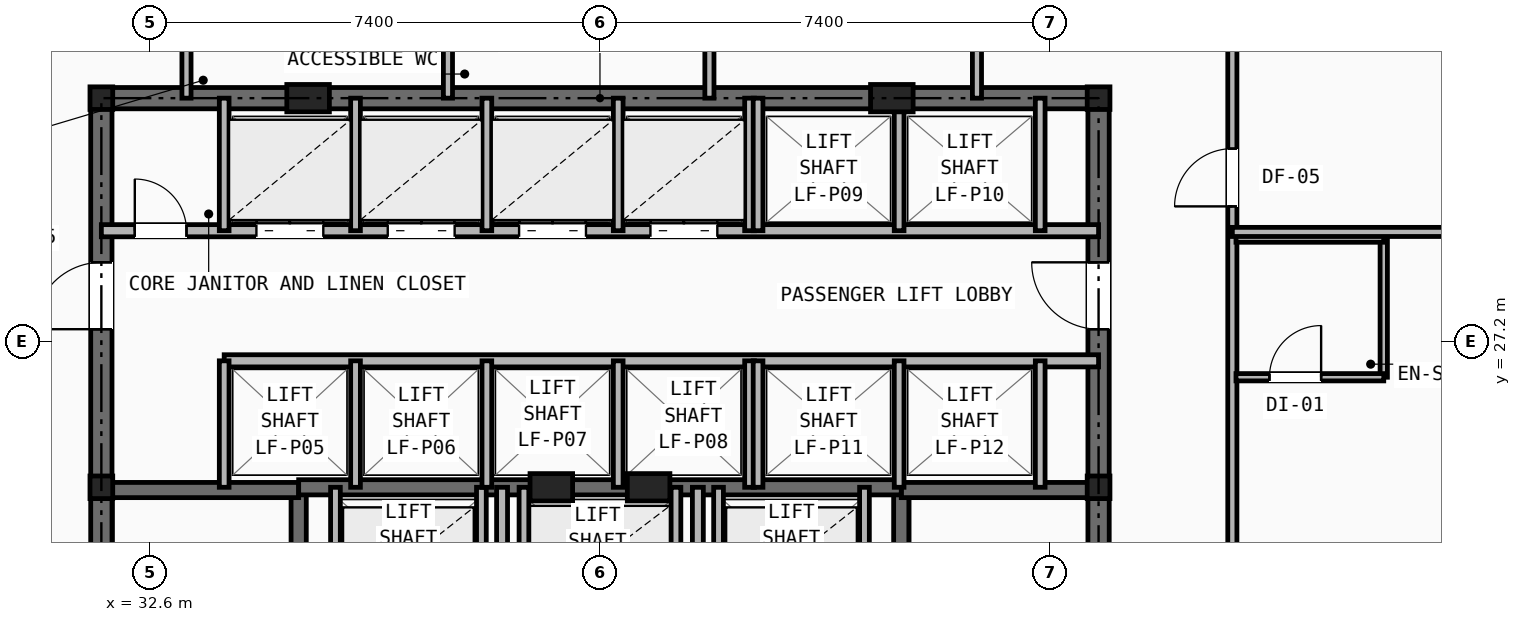
"""IFC4 building model, lengths in metres.
Left out: names, types, materials, properties, quantities, classifications, styles, units other than length and angle.
Written with IfcOpenShell. Run it as: python <this file> out.ifc"""

import sys

from ifc_helpers import new_model, si_unit, direction, frame, frame_2d, origin, origin_2d, place, context, subcontext, project, spatial, rectangle, i_section, extrude, element, fill, save


model = new_model("IFC4")
c1 = context("Model", 3, precision=1e-05, world=origin(), true_north=direction((0.0, 1.0)))
c2 = subcontext(c1, "Body", "Model", "MODEL_VIEW")
j1 = project(units=[si_unit("LENGTHUNIT", "METRE"), si_unit("PLANEANGLEUNIT", "RADIAN")], contexts=[c1])
p1 = place(None, origin())
s1 = spatial("IfcSite", under=j1, at=p1, CompositionType="ELEMENT")
p2 = place(p1, origin())
s2 = spatial("IfcBuilding", under=s1, at=p2, CompositionType="ELEMENT")
p3 = place(p2, frame((0.0, 0.0, 30.4)))
s3 = spatial("IfcBuildingStorey", under=s2, at=p3, CompositionType="ELEMENT", Elevation=30.4)
for number, where, z_axis, x_axis in (
    (1, (31.8, 24.8, 0.0), (0.0, 0.0, 1.0), (1.0, 0.0, 0.0)),
    (2, (48.2, 24.8, 0.0), (0.0, 0.0, 1.0), (1.0, 0.0, 0.0)),
    (3, (31.8, 31.2, 0.0), (0.0, 0.0, 1.0), (1.0, 0.0, 0.0)),
    (4, (48.2, 31.2, 0.0), (0.0, 0.0, 1.0), (1.0, 0.0, 0.0)),
):
    element("IfcColumn", number, at=place(p3, frame(where, z_axis=z_axis, x_axis=x_axis)), inside=s3, PredefinedType="COLUMN", context=c2, shape_type="SweptSolid", body=[
        extrude(i_section(OverallWidth=0.374, OverallDepth=0.372, WebThickness=0.016, FlangeThickness=0.026, at=origin_2d()), origin(), (0.0, 0.0, 1.0), 3.2),
    ])
for number, where, z_axis, x_axis in (
    (5, (35.2, 31.2, 0.0), (0.0, 0.0, 1.0), (1.0, 0.0, 0.0)),
    (6, (44.8, 31.2, 0.0), (0.0, 0.0, 1.0), (1.0, 0.0, 0.0)),
    (7, (39.2, 24.8, 0.0), (0.0, 0.0, 1.0), (1.0, 0.0, 0.0)),
    (8, (40.8, 24.8, 0.0), (0.0, 0.0, 1.0), (1.0, 0.0, 0.0)),
):
    element("IfcColumn", number, at=place(p3, frame(where, z_axis=z_axis, x_axis=x_axis)), inside=s3, PredefinedType="PILASTER", context=c2, shape_type="SweptSolid", body=[
        extrude(rectangle(XDim=0.7, YDim=0.45, at=origin_2d()), origin(), (0.0, 0.0, 1.0), 3.2),
    ])
p4 = place(p3, frame((31.8, 31.2, 0.0), z_axis=(0.0, 0.0, 1.0), x_axis=(1.0, 0.0, 0.0)))
e9 = element("IfcWall", 9, at=p4, inside=s3, PredefinedType="SHEAR", context=c2, shape_type="SweptSolid", body=[
    extrude(rectangle(XDim=16.4, YDim=0.35, at=frame_2d((8.2, 0.0))), origin(), (0.0, 0.0, 1.0), 2.98),
])
p5 = place(p3, frame((31.8, 16.4, 0.0), z_axis=(0.0, 0.0, 1.0), x_axis=(0.0, 1.0, 0.0)))
e10 = element("IfcWall", 10, at=p5, inside=s3, PredefinedType="SHEAR", context=c2, shape_type="SweptSolid", body=[
    extrude(rectangle(XDim=14.8, YDim=0.35, at=frame_2d((7.4, 0.0))), origin(), (0.0, 0.0, 1.0), 2.98),
])
p6 = place(p5, frame((11.0, 0.0, 0.0)))
e11 = element("IfcOpeningElement", 11, at=p6, cuts=e10, PredefinedType="OPENING", context=c2, shape_type="SweptSolid", body=[
    extrude(rectangle(XDim=1.1, YDim=2.15, at=frame_2d((0.55, 1.075))), frame((0.0, 0.185, 0.0), z_axis=(0.0, -1.0, 0.0), x_axis=(1.0, 0.0, 0.0)), (0.0, 0.0, 1.0), 0.37),
])
p7 = place(p3, frame((48.2, 16.4, 0.0), z_axis=(0.0, 0.0, 1.0), x_axis=(0.0, 1.0, 0.0)))
e12 = element("IfcWall", 12, at=p7, inside=s3, PredefinedType="SHEAR", context=c2, shape_type="SweptSolid", body=[
    extrude(rectangle(XDim=14.8, YDim=0.35, at=frame_2d((7.4, 0.0))), origin(), (0.0, 0.0, 1.0), 2.98),
])
p8 = place(p7, frame((11.0, 0.0, 0.0)))
e13 = element("IfcOpeningElement", 13, at=p8, cuts=e12, PredefinedType="OPENING", context=c2, shape_type="SweptSolid", body=[
    extrude(rectangle(XDim=1.1, YDim=2.15, at=frame_2d((0.55, 1.075))), frame((0.0, 0.185, 0.0), z_axis=(0.0, -1.0, 0.0), x_axis=(1.0, 0.0, 0.0)), (0.0, 0.0, 1.0), 0.37),
])
p9 = place(p3, frame((35.045, 16.4, 0.0), z_axis=(0.0, 0.0, 1.0), x_axis=(0.0, 1.0, 0.0)))
e14 = element("IfcWall", 14, at=p9, inside=s3, PredefinedType="SHEAR", context=c2, shape_type="SweptSolid", body=[
    extrude(rectangle(XDim=8.4, YDim=0.25, at=frame_2d((4.2, 0.0))), origin(), (0.0, 0.0, 1.0), 2.98),
])
p10 = place(p9, frame((0.45, 0.0, 0.0)))
e15 = element("IfcOpeningElement", 15, at=p10, cuts=e14, PredefinedType="OPENING", context=c2, shape_type="SweptSolid", body=[
    extrude(rectangle(XDim=0.95, YDim=2.1, at=frame_2d((0.475, 1.05))), frame((0.0, 0.135, 0.0), z_axis=(0.0, -1.0, 0.0), x_axis=(1.0, 0.0, 0.0)), (0.0, 0.0, 1.0), 0.27),
])
p11 = place(p3, frame((31.8, 24.755, 0.0), z_axis=(0.0, 0.0, 1.0), x_axis=(1.0, 0.0, 0.0)))
e16 = element("IfcWall", 16, at=p11, inside=s3, PredefinedType="SHEAR", context=c2, shape_type="SweptSolid", body=[
    extrude(rectangle(XDim=3.245, YDim=0.25, at=frame_2d((1.623, 0.0))), origin(), (0.0, 0.0, 1.0), 2.98),
])
p12 = place(p3, frame((44.955, 16.4, 0.0), z_axis=(0.0, 0.0, 1.0), x_axis=(0.0, 1.0, 0.0)))
e17 = element("IfcWall", 17, at=p12, inside=s3, PredefinedType="SHEAR", context=c2, shape_type="SweptSolid", body=[
    extrude(rectangle(XDim=8.4, YDim=0.25, at=frame_2d((4.2, 0.0))), origin(), (0.0, 0.0, 1.0), 2.98),
])
p13 = place(p12, frame((0.45, 0.0, 0.0)))
e18 = element("IfcOpeningElement", 18, at=p13, cuts=e17, PredefinedType="OPENING", context=c2, shape_type="SweptSolid", body=[
    extrude(rectangle(XDim=0.95, YDim=2.1, at=frame_2d((0.475, 1.05))), frame((0.0, 0.135, 0.0), z_axis=(0.0, -1.0, 0.0), x_axis=(1.0, 0.0, 0.0)), (0.0, 0.0, 1.0), 0.27),
])
p14 = place(p3, frame((44.955, 24.755, 0.0), z_axis=(0.0, 0.0, 1.0), x_axis=(1.0, 0.0, 0.0)))
e19 = element("IfcWall", 19, at=p14, inside=s3, PredefinedType="SHEAR", context=c2, shape_type="SweptSolid", body=[
    extrude(rectangle(XDim=3.245, YDim=0.25, at=frame_2d((1.623, 0.0))), origin(), (0.0, 0.0, 1.0), 2.98),
])
p15 = place(p3, frame((35.045, 24.8, 0.0), z_axis=(0.0, 0.0, 1.0), x_axis=(1.0, 0.0, 0.0)))
e20 = element("IfcWall", 20, at=p15, inside=s3, PredefinedType="SHEAR", context=c2, shape_type="SweptSolid", body=[
    extrude(rectangle(XDim=9.91, YDim=0.25, at=frame_2d((4.955, 0.0))), origin(), (0.0, 0.0, 1.0), 2.98),
])
p16 = place(p3, frame((38.39, 16.4, 0.0), z_axis=(0.0, 0.0, 1.0), x_axis=(0.0, 1.0, 0.0)))
e21 = element("IfcWall", 21, at=p16, inside=s3, PredefinedType="PARTITIONING", context=c2, shape_type="SweptSolid", body=[
    extrude(rectangle(XDim=8.4, YDim=0.18, at=frame_2d((4.2, 0.0))), origin(), (0.0, 0.0, 1.0), 2.431),
])
p17 = place(p16, frame((3.8, 0.0, 0.0)))
e22 = element("IfcOpeningElement", 22, at=p17, cuts=e21, PredefinedType="OPENING", context=c2, shape_type="SweptSolid", body=[
    extrude(rectangle(XDim=0.95, YDim=2.1, at=frame_2d((0.475, 1.05))), frame((0.0, 0.1, 0.0), z_axis=(0.0, -1.0, 0.0), x_axis=(1.0, 0.0, 0.0)), (0.0, 0.0, 1.0), 0.2),
])
p18 = place(p3, frame((41.61, 16.4, 0.0), z_axis=(0.0, 0.0, 1.0), x_axis=(0.0, 1.0, 0.0)))
e23 = element("IfcWall", 23, at=p18, inside=s3, PredefinedType="PARTITIONING", context=c2, shape_type="SweptSolid", body=[
    extrude(rectangle(XDim=8.4, YDim=0.18, at=frame_2d((4.2, 0.0))), origin(), (0.0, 0.0, 1.0), 2.431),
])
for number, where, z_axis, x_axis in (
    (24, (35.65, 22.48, 0.0), (0.0, 0.0, 1.0), (0.0, 1.0, 0.0)),
    (25, (38.05, 22.48, 0.0), (0.0, 0.0, 1.0), (0.0, 1.0, 0.0)),
    (26, (41.95, 22.48, 0.0), (0.0, 0.0, 1.0), (0.0, 1.0, 0.0)),
    (27, (44.35, 22.48, 0.0), (0.0, 0.0, 1.0), (0.0, 1.0, 0.0)),
    (28, (38.75, 22.48, 0.0), (0.0, 0.0, 1.0), (0.0, 1.0, 0.0)),
    (29, (41.25, 22.48, 0.0), (0.0, 0.0, 1.0), (0.0, 1.0, 0.0)),
):
    element("IfcWall", number, at=place(p3, frame(where, z_axis=z_axis, x_axis=x_axis)), inside=s3, PredefinedType="SOLIDWALL", context=c2, shape_type="SweptSolid", body=[
        extrude(rectangle(XDim=2.32, YDim=0.16, at=frame_2d((1.16, 0.0))), origin(), (0.0, 0.0, 1.0), 2.98),
    ])
p19 = place(p3, frame((31.8, 29.02, 0.0), z_axis=(0.0, 0.0, 1.0), x_axis=(1.0, 0.0, 0.0)))
e30 = element("IfcWall", 30, at=p19, inside=s3, PredefinedType="SOLIDWALL", context=c2, shape_type="SweptSolid", body=[
    extrude(rectangle(XDim=16.4, YDim=0.2, at=frame_2d((8.2, 0.0))), origin(), (0.0, 0.0, 1.0), 2.431),
])
p20 = place(p19, frame((0.55, 0.0, 0.0)))
e31 = element("IfcOpeningElement", 31, at=p20, cuts=e30, PredefinedType="OPENING", context=c2, shape_type="SweptSolid", body=[
    extrude(rectangle(XDim=0.85, YDim=2.05, at=frame_2d((0.425, 1.025))), frame((0.0, 0.11, 0.0), z_axis=(0.0, -1.0, 0.0), x_axis=(1.0, 0.0, 0.0)), (0.0, 0.0, 1.0), 0.22),
])
p21 = place(p19, frame((2.55, 0.0, 0.0)))
e32 = element("IfcOpeningElement", 32, at=p21, cuts=e30, PredefinedType="OPENING", context=c2, shape_type="SweptSolid", body=[
    extrude(rectangle(XDim=1.1, YDim=2.15, at=frame_2d((0.55, 1.075))), frame((0.0, 0.11, 0.0), z_axis=(0.0, -1.0, 0.0), x_axis=(1.0, 0.0, 0.0)), (0.0, 0.0, 1.0), 0.22),
])
p22 = place(p19, frame((4.71, 0.0, 0.0)))
e33 = element("IfcOpeningElement", 33, at=p22, cuts=e30, PredefinedType="OPENING", context=c2, shape_type="SweptSolid", body=[
    extrude(rectangle(XDim=1.1, YDim=2.15, at=frame_2d((0.55, 1.075))), frame((0.0, 0.11, 0.0), z_axis=(0.0, -1.0, 0.0), x_axis=(1.0, 0.0, 0.0)), (0.0, 0.0, 1.0), 0.22),
])
p23 = place(p19, frame((6.87, 0.0, 0.0)))
e34 = element("IfcOpeningElement", 34, at=p23, cuts=e30, PredefinedType="OPENING", context=c2, shape_type="SweptSolid", body=[
    extrude(rectangle(XDim=1.1, YDim=2.15, at=frame_2d((0.55, 1.075))), frame((0.0, 0.11, 0.0), z_axis=(0.0, -1.0, 0.0), x_axis=(1.0, 0.0, 0.0)), (0.0, 0.0, 1.0), 0.22),
])
p24 = place(p19, frame((9.03, 0.0, 0.0)))
e35 = element("IfcOpeningElement", 35, at=p24, cuts=e30, PredefinedType="OPENING", context=c2, shape_type="SweptSolid", body=[
    extrude(rectangle(XDim=1.1, YDim=2.15, at=frame_2d((0.55, 1.075))), frame((0.0, 0.11, 0.0), z_axis=(0.0, -1.0, 0.0), x_axis=(1.0, 0.0, 0.0)), (0.0, 0.0, 1.0), 0.22),
])
p25 = place(p3, frame((33.82, 26.88, 0.0), z_axis=(0.0, 0.0, 1.0), x_axis=(1.0, 0.0, 0.0)))
e36 = element("IfcWall", 36, at=p25, inside=s3, PredefinedType="SOLIDWALL", context=c2, shape_type="SweptSolid", body=[
    extrude(rectangle(XDim=14.38, YDim=0.2, at=frame_2d((7.19, 0.0))), origin(), (0.0, 0.0, 1.0), 2.431),
])
p26 = place(p3, frame((33.82, 29.02, 0.0), z_axis=(0.0, 0.0, 1.0), x_axis=(0.0, 1.0, 0.0)))
e37 = element("IfcWall", 37, at=p26, inside=s3, PredefinedType="SOLIDWALL", context=c2, shape_type="SweptSolid", body=[
    extrude(rectangle(XDim=2.18, YDim=0.16, at=frame_2d((1.09, 0.0))), origin(), (0.0, 0.0, 1.0), 2.431),
])
p27 = place(p3, frame((33.82, 24.8, 0.0), z_axis=(0.0, 0.0, 1.0), x_axis=(0.0, 1.0, 0.0)))
e38 = element("IfcWall", 38, at=p27, inside=s3, PredefinedType="SOLIDWALL", context=c2, shape_type="SweptSolid", body=[
    extrude(rectangle(XDim=2.08, YDim=0.16, at=frame_2d((1.04, 0.0))), origin(), (0.0, 0.0, 1.0), 2.98),
])
for number, where, z_axis, x_axis in (
    (39, (35.98, 29.02, 0.0), (0.0, 0.0, 1.0), (0.0, 1.0, 0.0)),
    (40, (38.14, 29.02, 0.0), (0.0, 0.0, 1.0), (0.0, 1.0, 0.0)),
    (41, (40.3, 29.02, 0.0), (0.0, 0.0, 1.0), (0.0, 1.0, 0.0)),
    (42, (42.46, 29.02, 0.0), (0.0, 0.0, 1.0), (0.0, 1.0, 0.0)),
):
    element("IfcWall", number, at=place(p3, frame(where, z_axis=z_axis, x_axis=x_axis)), inside=s3, PredefinedType="SOLIDWALL", context=c2, shape_type="SweptSolid", body=[
        extrude(rectangle(XDim=2.18, YDim=0.16, at=frame_2d((1.09, 0.0))), origin(), (0.0, 0.0, 1.0), 2.431),
    ])
for number, where, z_axis, x_axis in (
    (43, (35.98, 24.8, 0.0), (0.0, 0.0, 1.0), (0.0, 1.0, 0.0)),
    (44, (38.14, 24.8, 0.0), (0.0, 0.0, 1.0), (0.0, 1.0, 0.0)),
    (45, (40.3, 24.8, 0.0), (0.0, 0.0, 1.0), (0.0, 1.0, 0.0)),
    (46, (42.46, 24.8, 0.0), (0.0, 0.0, 1.0), (0.0, 1.0, 0.0)),
):
    element("IfcWall", number, at=place(p3, frame(where, z_axis=z_axis, x_axis=x_axis)), inside=s3, PredefinedType="SOLIDWALL", context=c2, shape_type="SweptSolid", body=[
        extrude(rectangle(XDim=2.08, YDim=0.16, at=frame_2d((1.04, 0.0))), origin(), (0.0, 0.0, 1.0), 2.98),
    ])
for number, where, z_axis, x_axis in (
    (47, (42.6, 29.02, 0.0), (0.0, 0.0, 1.0), (0.0, 1.0, 0.0)),
    (48, (44.92, 29.02, 0.0), (0.0, 0.0, 1.0), (0.0, 1.0, 0.0)),
    (49, (47.24, 29.02, 0.0), (0.0, 0.0, 1.0), (0.0, 1.0, 0.0)),
):
    element("IfcWall", number, at=place(p3, frame(where, z_axis=z_axis, x_axis=x_axis)), inside=s3, PredefinedType="SOLIDWALL", context=c2, shape_type="SweptSolid", body=[
        extrude(rectangle(XDim=2.18, YDim=0.16, at=frame_2d((1.09, 0.0))), origin(), (0.0, 0.0, 1.0), 2.431),
    ])
for number, where, z_axis, x_axis in (
    (50, (42.6, 24.8, 0.0), (0.0, 0.0, 1.0), (0.0, 1.0, 0.0)),
    (51, (44.92, 24.8, 0.0), (0.0, 0.0, 1.0), (0.0, 1.0, 0.0)),
    (52, (47.24, 24.8, 0.0), (0.0, 0.0, 1.0), (0.0, 1.0, 0.0)),
):
    element("IfcWall", number, at=place(p3, frame(where, z_axis=z_axis, x_axis=x_axis)), inside=s3, PredefinedType="SOLIDWALL", context=c2, shape_type="SweptSolid", body=[
        extrude(rectangle(XDim=2.08, YDim=0.16, at=frame_2d((1.04, 0.0))), origin(), (0.0, 0.0, 1.0), 2.98),
    ])
for number, where, z_axis, x_axis in (
    (53, (33.2, 31.2, 0.0), (0.0, 0.0, 1.0), (0.0, 1.0, 0.0)),
    (54, (46.2, 31.2, 0.0), (0.0, 0.0, 1.0), (0.0, 1.0, 0.0)),
    (55, (37.5, 31.2, 0.0), (0.0, 0.0, 1.0), (0.0, 1.0, 0.0)),
    (56, (41.8, 31.2, 0.0), (0.0, 0.0, 1.0), (0.0, 1.0, 0.0)),
):
    element("IfcWall", number, at=place(p3, frame(where, z_axis=z_axis, x_axis=x_axis)), inside=s3, PredefinedType="PARTITIONING", context=c2, shape_type="SweptSolid", body=[
        extrude(rectangle(XDim=2.6, YDim=0.15, at=frame_2d((1.3, 0.0))), origin(), (0.0, 0.0, 1.0), 2.431),
    ])
p28 = place(p3, frame((50.4, 14.1, 0.0), z_axis=(0.0, 0.0, 1.0), x_axis=(0.0, 1.0, 0.0)))
e57 = element("IfcWall", 57, at=p28, inside=s3, PredefinedType="PARTITIONING", context=c2, shape_type="SweptSolid", body=[
    extrude(rectangle(XDim=21.9, YDim=0.15, at=frame_2d((10.95, 0.0))), origin(), (0.0, 0.0, 1.0), 2.431),
])
p29 = place(p28, frame((0.42, 0.0, 0.0)))
e58 = element("IfcOpeningElement", 58, at=p29, cuts=e57, PredefinedType="OPENING", context=c2, shape_type="SweptSolid", body=[
    extrude(rectangle(XDim=0.95, YDim=2.1, at=frame_2d((0.475, 1.05))), frame((0.0, 0.085, 0.0), z_axis=(0.0, -1.0, 0.0), x_axis=(1.0, 0.0, 0.0)), (0.0, 0.0, 1.0), 0.17),
])
p30 = place(p28, frame((7.82, 0.0, 0.0)))
e59 = element("IfcOpeningElement", 59, at=p30, cuts=e57, PredefinedType="OPENING", context=c2, shape_type="SweptSolid", body=[
    extrude(rectangle(XDim=0.95, YDim=2.1, at=frame_2d((0.475, 1.05))), frame((0.0, 0.085, 0.0), z_axis=(0.0, -1.0, 0.0), x_axis=(1.0, 0.0, 0.0)), (0.0, 0.0, 1.0), 0.17),
])
p31 = place(p28, frame((15.32, 0.0, 0.0)))
e60 = element("IfcOpeningElement", 60, at=p31, cuts=e57, PredefinedType="OPENING", context=c2, shape_type="SweptSolid", body=[
    extrude(rectangle(XDim=0.95, YDim=2.1, at=frame_2d((0.475, 1.05))), frame((0.0, 0.085, 0.0), z_axis=(0.0, -1.0, 0.0), x_axis=(1.0, 0.0, 0.0)), (0.0, 0.0, 1.0), 0.17),
])
p32 = place(p3, frame((52.89, 26.61, 0.0), z_axis=(0.0, 0.0, 1.0), x_axis=(0.0, 1.0, 0.0)))
e61 = element("IfcWall", 61, at=p32, inside=s3, PredefinedType="PARTITIONING", context=c2, shape_type="SweptSolid", body=[
    extrude(rectangle(XDim=2.28, YDim=0.12, at=frame_2d((1.14, 0.0))), origin(), (0.0, 0.0, 1.0), 2.98),
])
p33 = place(p3, frame((50.46, 26.61, 0.0), z_axis=(0.0, 0.0, 1.0), x_axis=(1.0, 0.0, 0.0)))
e62 = element("IfcWall", 62, at=p33, inside=s3, PredefinedType="PARTITIONING", context=c2, shape_type="SweptSolid", body=[
    extrude(rectangle(XDim=2.43, YDim=0.12, at=frame_2d((1.215, 0.0))), origin(), (0.0, 0.0, 1.0), 2.98),
])
p34 = place(p33, frame((0.55, 0.0, 0.0)))
e63 = element("IfcOpeningElement", 63, at=p34, cuts=e62, PredefinedType="OPENING", context=c2, shape_type="SweptSolid", body=[
    extrude(rectangle(XDim=0.85, YDim=2.05, at=frame_2d((0.425, 1.025))), frame((0.0, 0.07, 0.0), z_axis=(0.0, -1.0, 0.0), x_axis=(1.0, 0.0, 0.0)), (0.0, 0.0, 1.0), 0.14),
])
p35 = place(p3, frame((50.46, 28.89, 0.0), z_axis=(0.0, 0.0, 1.0), x_axis=(1.0, 0.0, 0.0)))
e64 = element("IfcWall", 64, at=p35, inside=s3, PredefinedType="PARTITIONING", context=c2, shape_type="SweptSolid", body=[
    extrude(rectangle(XDim=2.43, YDim=0.12, at=frame_2d((1.215, 0.0))), origin(), (0.0, 0.0, 1.0), 2.98),
])
p36 = place(p3, frame((50.4, 29.0, 0.0), z_axis=(0.0, 0.0, 1.0), x_axis=(1.0, 0.0, 0.0)))
e65 = element("IfcWall", 65, at=p36, inside=s3, PredefinedType="PARTITIONING", context=c2, shape_type="SweptSolid", body=[
    extrude(rectangle(XDim=11.212, YDim=0.15, at=frame_2d((5.606, 0.0))), origin(), (0.0, 0.0, 1.0), 2.268),
])
p37 = place(p20, origin())
e66 = element("IfcDoor", 66, at=p37, inside=s3, OperationType="SINGLE_SWING_LEFT", PredefinedType="DOOR", context=c2, shape_type="SweptSolid", body=[
    extrude(rectangle(XDim=0.85, YDim=2.05, at=frame_2d((0.425, 1.025))), frame((0.0, 0.025, 0.0), z_axis=(0.0, -1.0, 0.0), x_axis=(1.0, 0.0, 0.0)), (0.0, 0.0, 1.0), 0.05),
])
fill(e31, e66)
p38 = place(p6, origin())
e67 = element("IfcDoor", 67, at=p38, inside=s3, OperationType="SINGLE_SWING_LEFT", PredefinedType="DOOR", context=c2, shape_type="SweptSolid", body=[
    extrude(rectangle(XDim=1.1, YDim=2.15, at=frame_2d((0.55, 1.075))), frame((0.0, 0.025, 0.0), z_axis=(0.0, -1.0, 0.0), x_axis=(1.0, 0.0, 0.0)), (0.0, 0.0, 1.0), 0.05),
])
fill(e11, e67)
p39 = place(p8, origin())
e68 = element("IfcDoor", 68, at=p39, inside=s3, OperationType="SINGLE_SWING_RIGHT", PredefinedType="DOOR", context=c2, shape_type="SweptSolid", body=[
    extrude(rectangle(XDim=1.1, YDim=2.15, at=frame_2d((0.55, 1.075))), frame((0.0, 0.025, 0.0), z_axis=(0.0, -1.0, 0.0), x_axis=(1.0, 0.0, 0.0)), (0.0, 0.0, 1.0), 0.05),
])
fill(e13, e68)
p40 = place(p21, origin())
e69 = element("IfcDoor", 69, at=p40, inside=s3, OperationType="DOUBLE_DOOR_SLIDING", PredefinedType="DOOR", context=c2, shape_type="SweptSolid", body=[
    extrude(rectangle(XDim=1.1, YDim=2.15, at=frame_2d((0.55, 1.075))), frame((0.0, 0.025, 0.0), z_axis=(0.0, -1.0, 0.0), x_axis=(1.0, 0.0, 0.0)), (0.0, 0.0, 1.0), 0.05),
])
fill(e32, e69)
p41 = place(p22, origin())
e70 = element("IfcDoor", 70, at=p41, inside=s3, OperationType="DOUBLE_DOOR_SLIDING", PredefinedType="DOOR", context=c2, shape_type="SweptSolid", body=[
    extrude(rectangle(XDim=1.1, YDim=2.15, at=frame_2d((0.55, 1.075))), frame((0.0, 0.025, 0.0), z_axis=(0.0, -1.0, 0.0), x_axis=(1.0, 0.0, 0.0)), (0.0, 0.0, 1.0), 0.05),
])
fill(e33, e70)
p42 = place(p23, origin())
e71 = element("IfcDoor", 71, at=p42, inside=s3, OperationType="DOUBLE_DOOR_SLIDING", PredefinedType="DOOR", context=c2, shape_type="SweptSolid", body=[
    extrude(rectangle(XDim=1.1, YDim=2.15, at=frame_2d((0.55, 1.075))), frame((0.0, 0.025, 0.0), z_axis=(0.0, -1.0, 0.0), x_axis=(1.0, 0.0, 0.0)), (0.0, 0.0, 1.0), 0.05),
])
fill(e34, e71)
p43 = place(p24, origin())
e72 = element("IfcDoor", 72, at=p43, inside=s3, OperationType="DOUBLE_DOOR_SLIDING", PredefinedType="DOOR", context=c2, shape_type="SweptSolid", body=[
    extrude(rectangle(XDim=1.1, YDim=2.15, at=frame_2d((0.55, 1.075))), frame((0.0, 0.025, 0.0), z_axis=(0.0, -1.0, 0.0), x_axis=(1.0, 0.0, 0.0)), (0.0, 0.0, 1.0), 0.05),
])
fill(e35, e72)
p44 = place(p34, origin())
e73 = element("IfcDoor", 73, at=p44, inside=s3, OperationType="SINGLE_SWING_RIGHT", PredefinedType="DOOR", context=c2, shape_type="SweptSolid", body=[
    extrude(rectangle(XDim=0.85, YDim=2.05, at=frame_2d((0.425, 1.025))), frame((0.0, 0.025, 0.0), z_axis=(0.0, -1.0, 0.0), x_axis=(1.0, 0.0, 0.0)), (0.0, 0.0, 1.0), 0.05),
])
fill(e63, e73)
p45 = place(p31, origin())
e74 = element("IfcDoor", 74, at=p45, inside=s3, OperationType="SINGLE_SWING_LEFT", PredefinedType="DOOR", context=c2, shape_type="SweptSolid", body=[
    extrude(rectangle(XDim=0.95, YDim=2.1, at=frame_2d((0.475, 1.05))), frame((0.0, 0.025, 0.0), z_axis=(0.0, -1.0, 0.0), x_axis=(1.0, 0.0, 0.0)), (0.0, 0.0, 1.0), 0.05),
])
fill(e60, e74)
save(model, sys.argv[1])
